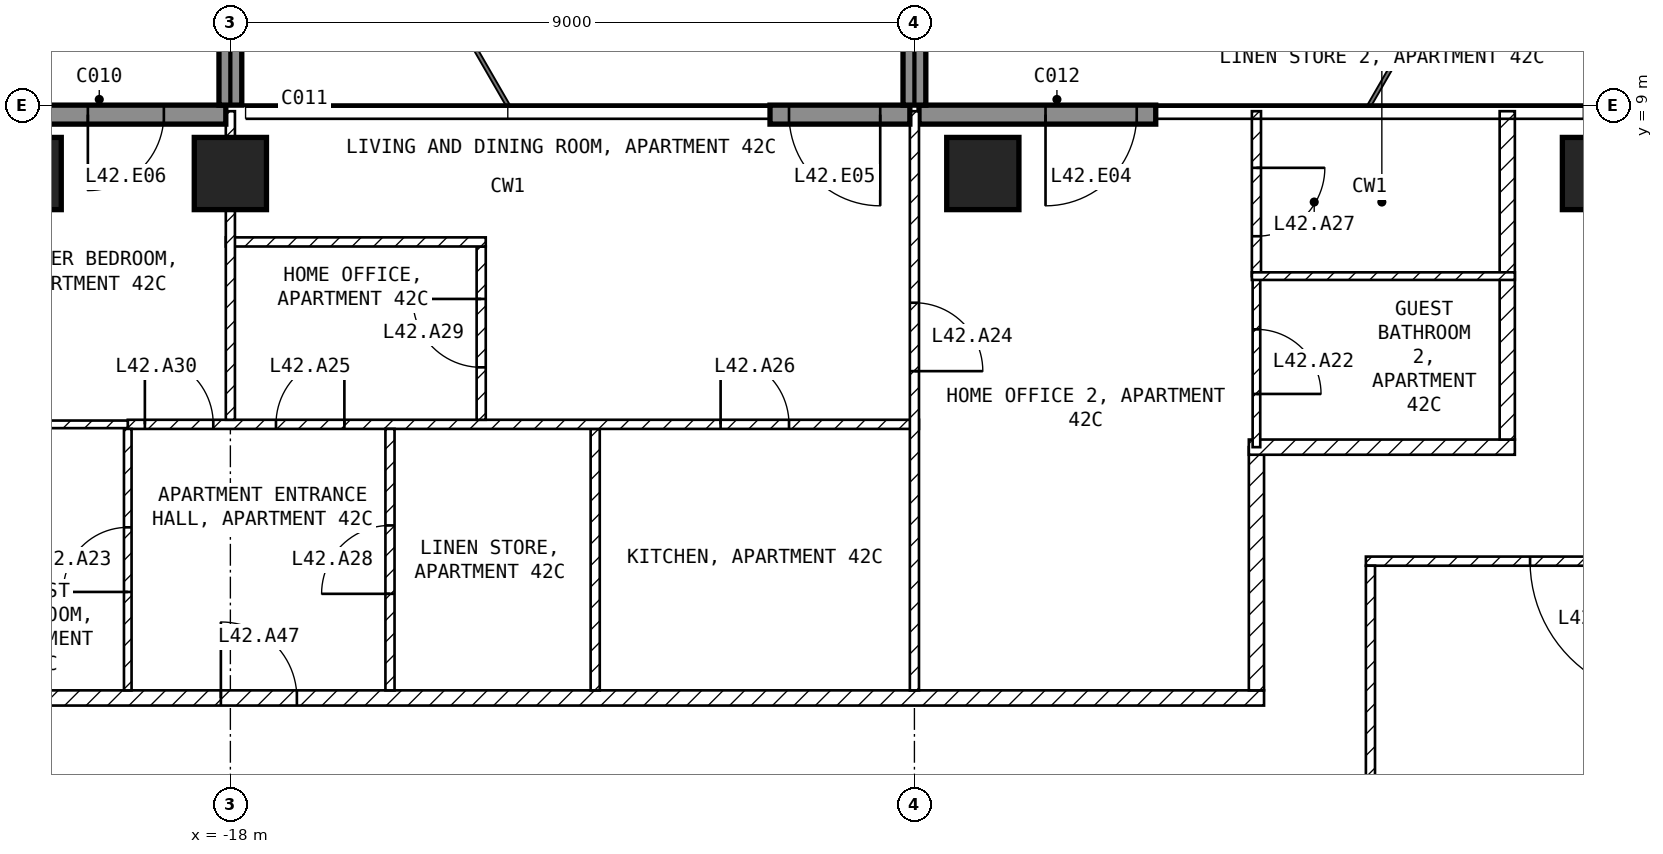
"""IFC4 building model, lengths in metres.
Left out: names, types, materials, properties, quantities, classifications, styles, units other than length and angle.
Written with IfcOpenShell. Run it as: python <this file> out.ifc"""

import sys

from ifc_helpers import new_model, si_unit, direction, frame, frame_2d, origin, origin_2d, place, context, subcontext, project, spatial, rectangle, extrude, element, fill, save


model = new_model("IFC4")
c1 = context("Model", 3, precision=1e-05, world=origin(), true_north=direction((0.0, 1.0)))
c2 = subcontext(c1, "Body", "Model", "MODEL_VIEW")
j1 = project(units=[si_unit("LENGTHUNIT", "METRE"), si_unit("PLANEANGLEUNIT", "RADIAN")], contexts=[c1])
p1 = place(None, origin())
s1 = spatial("IfcSite", under=j1, at=p1, CompositionType="ELEMENT")
p2 = place(p1, origin())
s2 = spatial("IfcBuilding", under=s1, at=p2, CompositionType="ELEMENT")
p3 = place(p2, frame((0.0, 0.0, 173.6)))
s3 = spatial("IfcBuildingStorey", under=s2, at=p3, CompositionType="ELEMENT", Elevation=173.6)
for number, where, z_axis, x_axis in (
    (1, (-20.7, 8.1, -0.25), (0.0, 0.0, 1.0), (1.0, 0.0, 0.0)),
    (2, (-18.0, 8.1, -0.25), (0.0, 0.0, 1.0), (1.0, 0.0, 0.0)),
    (3, (-8.1, 8.1, -0.25), (0.0, 0.0, 1.0), (1.0, 0.0, 0.0)),
    (4, (0.0, 8.1, -0.25), (0.0, 0.0, 1.0), (1.0, 0.0, 0.0)),
):
    element("IfcColumn", number, at=place(p3, frame(where, z_axis=z_axis, x_axis=x_axis)), inside=s3, PredefinedType="COLUMN", context=c2, shape_type="SweptSolid", body=[
        extrude(rectangle(XDim=0.95, YDim=0.95, at=origin_2d()), origin(), (0.0, 0.0, 1.0), 3.5),
    ])
p4 = place(p3, frame((-5.825, 8.875, 0.0), z_axis=(0.0, 0.0, 1.0), x_axis=(-1.0, 0.0, 0.0)))
e5 = element("IfcWall", 5, at=p4, inside=s3, PredefinedType="SOLIDWALL", context=c2, shape_type="SweptSolid", body=[
    extrude(rectangle(XDim=3.115, YDim=0.25, at=frame_2d((1.558, 0.0))), origin(), (0.0, 0.0, 1.0), 3.25),
])
p5 = place(p4, frame((0.25, 0.0, 0.0)))
e6 = element("IfcOpeningElement", 6, at=p5, cuts=e5, PredefinedType="OPENING", context=c2, shape_type="SweptSolid", body=[
    extrude(rectangle(XDim=1.2, YDim=2.4, at=frame_2d((0.6, 1.2))), frame((0.0, 0.135, 0.0), z_axis=(0.0, -1.0, 0.0), x_axis=(1.0, 0.0, 0.0)), (0.0, 0.0, 1.0), 0.27),
])
p6 = place(p3, frame((-9.06, 8.875, 0.0), z_axis=(0.0, 0.0, 1.0), x_axis=(-1.0, 0.0, 0.0)))
e7 = element("IfcWall", 7, at=p6, inside=s3, PredefinedType="SOLIDWALL", context=c2, shape_type="SweptSolid", body=[
    extrude(rectangle(XDim=1.84, YDim=0.25, at=frame_2d((0.92, 0.0))), origin(), (0.0, 0.0, 1.0), 3.25),
])
p7 = place(p6, frame((0.39, 0.0, 0.0)))
e8 = element("IfcOpeningElement", 8, at=p7, cuts=e7, PredefinedType="OPENING", context=c2, shape_type="SweptSolid", body=[
    extrude(rectangle(XDim=1.2, YDim=2.4, at=frame_2d((0.6, 1.2))), frame((0.0, 0.135, 0.0), z_axis=(0.0, -1.0, 0.0), x_axis=(1.0, 0.0, 0.0)), (0.0, 0.0, 1.0), 0.27),
])
p8 = place(p3, frame((-18.06, 8.875, 0.0), z_axis=(0.0, 0.0, 1.0), x_axis=(-1.0, 0.0, 0.0)))
e9 = element("IfcWall", 9, at=p8, inside=s3, PredefinedType="SOLIDWALL", context=c2, shape_type="SweptSolid", body=[
    extrude(rectangle(XDim=3.115, YDim=0.25, at=frame_2d((1.558, 0.0))), origin(), (0.0, 0.0, 1.0), 3.25),
])
p9 = place(p8, frame((0.815, 0.0, 0.0)))
e10 = element("IfcOpeningElement", 10, at=p9, cuts=e9, PredefinedType="OPENING", context=c2, shape_type="SweptSolid", body=[
    extrude(rectangle(XDim=1.0, YDim=2.4, at=frame_2d((0.5, 1.2))), frame((0.0, 0.135, 0.0), z_axis=(0.0, -1.0, 0.0), x_axis=(1.0, 0.0, 0.0)), (0.0, 0.0, 1.0), 0.27),
])
for number, where, z_axis, x_axis in (
    (11, (-18.0, 9.0, 0.0), (0.0, 0.0, 1.0), (0.0, 1.0, 0.0)),
    (12, (-9.0, 9.0, 0.0), (0.0, 0.0, 1.0), (0.0, 1.0, 0.0)),
):
    element("IfcWall", number, at=place(p3, frame(where, z_axis=z_axis, x_axis=x_axis)), inside=s3, PredefinedType="SOLIDWALL", context=c2, shape_type="SweptSolid", body=[
        extrude(rectangle(XDim=2.7, YDim=0.3, at=frame_2d((1.35, 0.0))), origin(), (0.0, 0.0, 1.0), 3.25),
    ])
p10 = place(p3, frame((3.06, 3.0, 0.0), z_axis=(0.0, 0.0, 1.0), x_axis=(-1.0, 0.0, 0.0)))
e13 = element("IfcWall", 13, at=p10, inside=s3, PredefinedType="PARTITIONING", context=c2, shape_type="SweptSolid", body=[
    extrude(rectangle(XDim=6.12, YDim=0.12, at=frame_2d((3.06, 0.0))), origin(), (0.0, 0.0, 1.0), 3.25),
])
p11 = place(p10, frame((2.16, 0.0, 0.0)))
e14 = element("IfcOpeningElement", 14, at=p11, cuts=e13, PredefinedType="OPENING", context=c2, shape_type="SweptSolid", body=[
    extrude(rectangle(XDim=1.8, YDim=2.1, at=frame_2d((0.9, 1.05))), frame((0.0, 0.07, 0.0), z_axis=(0.0, -1.0, 0.0), x_axis=(1.0, 0.0, 0.0)), (0.0, 0.0, 1.0), 0.14),
])
p12 = place(p3, frame((-3.0, 2.94, 0.0), z_axis=(0.0, 0.0, 1.0), x_axis=(0.0, -1.0, 0.0)))
e15 = element("IfcWall", 15, at=p12, inside=s3, PredefinedType="PARTITIONING", context=c2, shape_type="SweptSolid", body=[
    extrude(rectangle(XDim=5.88, YDim=0.12, at=frame_2d((2.94, 0.0))), origin(), (0.0, 0.0, 1.0), 3.25),
])
p13 = place(p3, frame((-21.6, 1.2, 0.0), z_axis=(0.0, 0.0, 1.0), x_axis=(1.0, 0.0, 0.0)))
e16 = element("IfcWall", 16, at=p13, inside=s3, PredefinedType="PARTITIONING", context=c2, shape_type="SweptSolid", body=[
    extrude(rectangle(XDim=17.2, YDim=0.2, at=frame_2d((8.6, 0.0))), origin(), (0.0, 0.0, 1.0), 3.25),
])
p14 = place(p13, frame((3.475, 0.0, 0.0)))
e17 = element("IfcOpeningElement", 17, at=p14, cuts=e16, PredefinedType="OPENING", context=c2, shape_type="SweptSolid", body=[
    extrude(rectangle(XDim=1.0, YDim=2.1, at=frame_2d((0.5, 1.05))), frame((0.0, 0.11, 0.0), z_axis=(0.0, -1.0, 0.0), x_axis=(1.0, 0.0, 0.0)), (0.0, 0.0, 1.0), 0.22),
])
p15 = place(p3, frame((-4.5, 1.3, 0.0), z_axis=(0.0, 0.0, 1.0), x_axis=(0.0, 1.0, 0.0)))
e18 = element("IfcWall", 18, at=p15, inside=s3, PredefinedType="PARTITIONING", context=c2, shape_type="SweptSolid", body=[
    extrude(rectangle(XDim=3.2, YDim=0.2, at=frame_2d((1.6, 0.0))), origin(), (0.0, 0.0, 1.0), 3.25),
])
p16 = place(p3, frame((-4.6, 4.5, 0.0), z_axis=(0.0, 0.0, 1.0), x_axis=(1.0, 0.0, 0.0)))
e19 = element("IfcWall", 19, at=p16, inside=s3, PredefinedType="PARTITIONING", context=c2, shape_type="SweptSolid", body=[
    extrude(rectangle(XDim=3.5, YDim=0.2, at=frame_2d((1.75, 0.0))), origin(), (0.0, 0.0, 1.0), 3.25),
])
p17 = place(p3, frame((-1.2, 4.6, 0.0), z_axis=(0.0, 0.0, 1.0), x_axis=(0.0, 1.0, 0.0)))
e20 = element("IfcWall", 20, at=p17, inside=s3, PredefinedType="PARTITIONING", context=c2, shape_type="SweptSolid", body=[
    extrude(rectangle(XDim=4.32, YDim=0.2, at=frame_2d((2.16, 0.0))), origin(), (0.0, 0.0, 1.0), 3.25),
])
p18 = place(p3, frame((-13.2, 1.3, 0.0), z_axis=(0.0, 0.0, 1.0), x_axis=(0.0, 1.0, 0.0)))
e21 = element("IfcWall", 21, at=p18, inside=s3, PredefinedType="PARTITIONING", context=c2, shape_type="SweptSolid", body=[
    extrude(rectangle(XDim=3.44, YDim=0.12, at=frame_2d((1.72, 0.0))), origin(), (0.0, 0.0, 1.0), 3.25),
])
p19 = place(p3, frame((-19.35, 4.8, 0.0), z_axis=(0.0, 0.0, 1.0), x_axis=(1.0, 0.0, 0.0)))
e22 = element("IfcWall", 22, at=p19, inside=s3, PredefinedType="PARTITIONING", context=c2, shape_type="SweptSolid", body=[
    extrude(rectangle(XDim=10.41, YDim=0.12, at=frame_2d((5.205, 0.0))), origin(), (0.0, 0.0, 1.0), 3.25),
])
p20 = place(p19, frame((1.95, 0.0, 0.0)))
e23 = element("IfcOpeningElement", 23, at=p20, cuts=e22, PredefinedType="OPENING", context=c2, shape_type="SweptSolid", body=[
    extrude(rectangle(XDim=0.9, YDim=2.1, at=frame_2d((0.45, 1.05))), frame((0.0, 0.07, 0.0), z_axis=(0.0, -1.0, 0.0), x_axis=(1.0, 0.0, 0.0)), (0.0, 0.0, 1.0), 0.14),
])
p21 = place(p19, frame((7.8, 0.0, 0.0)))
e24 = element("IfcOpeningElement", 24, at=p21, cuts=e22, PredefinedType="OPENING", context=c2, shape_type="SweptSolid", body=[
    extrude(rectangle(XDim=0.9, YDim=2.1, at=frame_2d((0.45, 1.05))), frame((0.0, 0.07, 0.0), z_axis=(0.0, -1.0, 0.0), x_axis=(1.0, 0.0, 0.0)), (0.0, 0.0, 1.0), 0.14),
])
p22 = place(p19, frame((0.225, 0.0, 0.0)))
e25 = element("IfcOpeningElement", 25, at=p22, cuts=e22, PredefinedType="OPENING", context=c2, shape_type="SweptSolid", body=[
    extrude(rectangle(XDim=0.9, YDim=2.1, at=frame_2d((0.45, 1.05))), frame((0.0, 0.07, 0.0), z_axis=(0.0, -1.0, 0.0), x_axis=(1.0, 0.0, 0.0)), (0.0, 0.0, 1.0), 0.14),
])
p23 = place(p3, frame((-9.0, 8.92, 0.0), z_axis=(0.0, 0.0, 1.0), x_axis=(0.0, -1.0, 0.0)))
e26 = element("IfcWall", 26, at=p23, inside=s3, PredefinedType="PARTITIONING", context=c2, shape_type="SweptSolid", body=[
    extrude(rectangle(XDim=7.62, YDim=0.12, at=frame_2d((3.81, 0.0))), origin(), (0.0, 0.0, 1.0), 3.25),
])
p24 = place(p23, frame((2.52, 0.0, 0.0)))
e27 = element("IfcOpeningElement", 27, at=p24, cuts=e26, PredefinedType="OPENING", context=c2, shape_type="SweptSolid", body=[
    extrude(rectangle(XDim=0.9, YDim=2.1, at=frame_2d((0.45, 1.05))), frame((0.0, 0.07, 0.0), z_axis=(0.0, -1.0, 0.0), x_axis=(1.0, 0.0, 0.0)), (0.0, 0.0, 1.0), 0.14),
])
p25 = place(p3, frame((-15.9, 1.3, 0.0), z_axis=(0.0, 0.0, 1.0), x_axis=(0.0, 1.0, 0.0)))
e28 = element("IfcWall", 28, at=p25, inside=s3, PredefinedType="PARTITIONING", context=c2, shape_type="SweptSolid", body=[
    extrude(rectangle(XDim=3.44, YDim=0.12, at=frame_2d((1.72, 0.0))), origin(), (0.0, 0.0, 1.0), 3.25),
])
p26 = place(p25, frame((1.27, 0.0, 0.0)))
e29 = element("IfcOpeningElement", 29, at=p26, cuts=e28, PredefinedType="OPENING", context=c2, shape_type="SweptSolid", body=[
    extrude(rectangle(XDim=0.9, YDim=2.1, at=frame_2d((0.45, 1.05))), frame((0.0, 0.07, 0.0), z_axis=(0.0, -1.0, 0.0), x_axis=(1.0, 0.0, 0.0)), (0.0, 0.0, 1.0), 0.14),
])
p27 = place(p3, frame((-19.35, 1.3, 0.0), z_axis=(0.0, 0.0, 1.0), x_axis=(0.0, 1.0, 0.0)))
e30 = element("IfcWall", 30, at=p27, inside=s3, PredefinedType="PARTITIONING", context=c2, shape_type="SweptSolid", body=[
    extrude(rectangle(XDim=3.44, YDim=0.1, at=frame_2d((1.72, 0.0))), origin(), (0.0, 0.0, 1.0), 3.25),
])
p28 = place(p27, frame((1.295, 0.0, 0.0)))
e31 = element("IfcOpeningElement", 31, at=p28, cuts=e30, PredefinedType="OPENING", context=c2, shape_type="SweptSolid", body=[
    extrude(rectangle(XDim=0.85, YDim=2.1, at=frame_2d((0.425, 1.05))), frame((0.0, 0.06, 0.0), z_axis=(0.0, -1.0, 0.0), x_axis=(1.0, 0.0, 0.0)), (0.0, 0.0, 1.0), 0.12),
])
p29 = place(p3, frame((-21.6, 4.8, 0.0), z_axis=(0.0, 0.0, 1.0), x_axis=(1.0, 0.0, 0.0)))
e32 = element("IfcWall", 32, at=p29, inside=s3, PredefinedType="PARTITIONING", context=c2, shape_type="SweptSolid", body=[
    extrude(rectangle(XDim=2.25, YDim=0.1, at=frame_2d((1.125, 0.0))), origin(), (0.0, 0.0, 1.0), 3.25),
])
p30 = place(p3, frame((-14.7, 4.86, 0.0), z_axis=(0.0, 0.0, 1.0), x_axis=(0.0, 1.0, 0.0)))
e33 = element("IfcWall", 33, at=p30, inside=s3, PredefinedType="PARTITIONING", context=c2, shape_type="SweptSolid", body=[
    extrude(rectangle(XDim=2.28, YDim=0.12, at=frame_2d((1.14, 0.0))), origin(), (0.0, 0.0, 1.0), 3.25),
])
p31 = place(p30, frame((0.69, 0.0, 0.0)))
e34 = element("IfcOpeningElement", 34, at=p31, cuts=e33, PredefinedType="OPENING", context=c2, shape_type="SweptSolid", body=[
    extrude(rectangle(XDim=0.9, YDim=2.1, at=frame_2d((0.45, 1.05))), frame((0.0, 0.07, 0.0), z_axis=(0.0, -1.0, 0.0), x_axis=(1.0, 0.0, 0.0)), (0.0, 0.0, 1.0), 0.14),
])
p32 = place(p3, frame((-14.64, 7.2, 0.0), z_axis=(0.0, 0.0, 1.0), x_axis=(-1.0, 0.0, 0.0)))
e35 = element("IfcWall", 35, at=p32, inside=s3, PredefinedType="PARTITIONING", context=c2, shape_type="SweptSolid", body=[
    extrude(rectangle(XDim=3.42, YDim=0.12, at=frame_2d((1.71, 0.0))), origin(), (0.0, 0.0, 1.0), 3.25),
])
p33 = place(p3, frame((-18.0, 4.86, 0.0), z_axis=(0.0, 0.0, 1.0), x_axis=(0.0, 1.0, 0.0)))
e36 = element("IfcWall", 36, at=p33, inside=s3, PredefinedType="PARTITIONING", context=c2, shape_type="SweptSolid", body=[
    extrude(rectangle(XDim=4.06, YDim=0.12, at=frame_2d((2.03, 0.0))), origin(), (0.0, 0.0, 1.0), 2.48),
])
p34 = place(p3, frame((-4.5, 6.75, 0.0), z_axis=(0.0, 0.0, 1.0), x_axis=(0.0, -1.0, 0.0)))
e37 = element("IfcWall", 37, at=p34, inside=s3, PredefinedType="PARTITIONING", context=c2, shape_type="SweptSolid", body=[
    extrude(rectangle(XDim=2.25, YDim=0.1, at=frame_2d((1.125, 0.0))), origin(), (0.0, 0.0, 1.0), 3.25),
])
p35 = place(p34, frame((0.7, 0.0, 0.0)))
e38 = element("IfcOpeningElement", 38, at=p35, cuts=e37, PredefinedType="OPENING", context=c2, shape_type="SweptSolid", body=[
    extrude(rectangle(XDim=0.85, YDim=2.1, at=frame_2d((0.425, 1.05))), frame((0.0, 0.06, 0.0), z_axis=(0.0, -1.0, 0.0), x_axis=(1.0, 0.0, 0.0)), (0.0, 0.0, 1.0), 0.12),
])
p36 = place(p3, frame((-4.5, 8.92, 0.0), z_axis=(0.0, 0.0, 1.0), x_axis=(0.0, -1.0, 0.0)))
e39 = element("IfcWall", 39, at=p36, inside=s3, PredefinedType="PARTITIONING", context=c2, shape_type="SweptSolid", body=[
    extrude(rectangle(XDim=2.17, YDim=0.12, at=frame_2d((1.085, 0.0))), origin(), (0.0, 0.0, 1.0), 3.25),
])
p37 = place(p36, frame((0.745, 0.0, 0.0)))
e40 = element("IfcOpeningElement", 40, at=p37, cuts=e39, PredefinedType="OPENING", context=c2, shape_type="SweptSolid", body=[
    extrude(rectangle(XDim=0.9, YDim=2.1, at=frame_2d((0.45, 1.05))), frame((0.0, 0.07, 0.0), z_axis=(0.0, -1.0, 0.0), x_axis=(1.0, 0.0, 0.0)), (0.0, 0.0, 1.0), 0.14),
])
p38 = place(p3, frame((-4.56, 6.75, 0.0), z_axis=(0.0, 0.0, 1.0), x_axis=(1.0, 0.0, 0.0)))
e41 = element("IfcWall", 41, at=p38, inside=s3, PredefinedType="PARTITIONING", context=c2, shape_type="SweptSolid", body=[
    extrude(rectangle(XDim=3.46, YDim=0.1, at=frame_2d((1.73, 0.0))), origin(), (0.0, 0.0, 1.0), 3.25),
])
p39 = place(p5, origin())
e42 = element("IfcDoor", 42, at=p39, inside=s3, OperationType="SINGLE_SWING_RIGHT", PredefinedType="DOOR", context=c2, shape_type="SweptSolid", body=[
    extrude(rectangle(XDim=1.2, YDim=2.4, at=frame_2d((0.6, 1.2))), frame((0.0, 0.025, 0.0), z_axis=(0.0, -1.0, 0.0), x_axis=(1.0, 0.0, 0.0)), (0.0, 0.0, 1.0), 0.05),
])
fill(e6, e42)
p40 = place(p7, origin())
e43 = element("IfcDoor", 43, at=p40, inside=s3, OperationType="SINGLE_SWING_LEFT", PredefinedType="DOOR", context=c2, shape_type="SweptSolid", body=[
    extrude(rectangle(XDim=1.2, YDim=2.4, at=frame_2d((0.6, 1.2))), frame((0.0, 0.025, 0.0), z_axis=(0.0, -1.0, 0.0), x_axis=(1.0, 0.0, 0.0)), (0.0, 0.0, 1.0), 0.05),
])
fill(e8, e43)
p41 = place(p9, origin())
e44 = element("IfcDoor", 44, at=p41, inside=s3, OperationType="SINGLE_SWING_RIGHT", PredefinedType="DOOR", context=c2, shape_type="SweptSolid", body=[
    extrude(rectangle(XDim=1.0, YDim=2.4, at=frame_2d((0.5, 1.2))), frame((0.0, 0.025, 0.0), z_axis=(0.0, -1.0, 0.0), x_axis=(1.0, 0.0, 0.0)), (0.0, 0.0, 1.0), 0.05),
])
fill(e10, e44)
p42 = place(p11, origin())
e45 = element("IfcDoor", 45, at=p42, inside=s3, OperationType="SINGLE_SWING_LEFT", PredefinedType="DOOR", context=c2, shape_type="SweptSolid", body=[
    extrude(rectangle(XDim=1.8, YDim=2.1, at=frame_2d((0.9, 1.05))), frame((0.0, 0.025, 0.0), z_axis=(0.0, -1.0, 0.0), x_axis=(1.0, 0.0, 0.0)), (0.0, 0.0, 1.0), 0.05),
])
fill(e14, e45)
p43 = place(p35, origin())
e46 = element("IfcDoor", 46, at=p43, inside=s3, OperationType="SINGLE_SWING_RIGHT", PredefinedType="DOOR", context=c2, shape_type="SweptSolid", body=[
    extrude(rectangle(XDim=0.85, YDim=2.1, at=frame_2d((0.425, 1.05))), frame((0.0, 0.025, 0.0), z_axis=(0.0, -1.0, 0.0), x_axis=(1.0, 0.0, 0.0)), (0.0, 0.0, 1.0), 0.05),
])
fill(e38, e46)
p44 = place(p28, origin())
e47 = element("IfcDoor", 47, at=p44, inside=s3, OperationType="SINGLE_SWING_LEFT", PredefinedType="DOOR", context=c2, shape_type="SweptSolid", body=[
    extrude(rectangle(XDim=0.85, YDim=2.1, at=frame_2d((0.425, 1.05))), frame((0.0, 0.025, 0.0), z_axis=(0.0, -1.0, 0.0), x_axis=(1.0, 0.0, 0.0)), (0.0, 0.0, 1.0), 0.05),
])
fill(e31, e47)
p45 = place(p24, origin())
e48 = element("IfcDoor", 48, at=p45, inside=s3, OperationType="SINGLE_SWING_RIGHT", PredefinedType="DOOR", context=c2, shape_type="SweptSolid", body=[
    extrude(rectangle(XDim=0.9, YDim=2.1, at=frame_2d((0.45, 1.05))), frame((0.0, 0.025, 0.0), z_axis=(0.0, -1.0, 0.0), x_axis=(1.0, 0.0, 0.0)), (0.0, 0.0, 1.0), 0.05),
])
fill(e27, e48)
p46 = place(p20, origin())
e49 = element("IfcDoor", 49, at=p46, inside=s3, OperationType="SINGLE_SWING_RIGHT", PredefinedType="DOOR", context=c2, shape_type="SweptSolid", body=[
    extrude(rectangle(XDim=0.9, YDim=2.1, at=frame_2d((0.45, 1.05))), frame((0.0, 0.025, 0.0), z_axis=(0.0, -1.0, 0.0), x_axis=(1.0, 0.0, 0.0)), (0.0, 0.0, 1.0), 0.05),
])
fill(e23, e49)
p47 = place(p21, origin())
e50 = element("IfcDoor", 50, at=p47, inside=s3, OperationType="SINGLE_SWING_LEFT", PredefinedType="DOOR", context=c2, shape_type="SweptSolid", body=[
    extrude(rectangle(XDim=0.9, YDim=2.1, at=frame_2d((0.45, 1.05))), frame((0.0, 0.025, 0.0), z_axis=(0.0, -1.0, 0.0), x_axis=(1.0, 0.0, 0.0)), (0.0, 0.0, 1.0), 0.05),
])
fill(e24, e50)
p48 = place(p37, origin())
e51 = element("IfcDoor", 51, at=p48, inside=s3, OperationType="SINGLE_SWING_LEFT", PredefinedType="DOOR", context=c2, shape_type="SweptSolid", body=[
    extrude(rectangle(XDim=0.9, YDim=2.1, at=frame_2d((0.45, 1.05))), frame((0.0, 0.025, 0.0), z_axis=(0.0, -1.0, 0.0), x_axis=(1.0, 0.0, 0.0)), (0.0, 0.0, 1.0), 0.05),
])
fill(e40, e51)
p49 = place(p26, origin())
e52 = element("IfcDoor", 52, at=p49, inside=s3, OperationType="SINGLE_SWING_LEFT", PredefinedType="DOOR", context=c2, shape_type="SweptSolid", body=[
    extrude(rectangle(XDim=0.9, YDim=2.1, at=frame_2d((0.45, 1.05))), frame((0.0, 0.025, 0.0), z_axis=(0.0, -1.0, 0.0), x_axis=(1.0, 0.0, 0.0)), (0.0, 0.0, 1.0), 0.05),
])
fill(e29, e52)
p50 = place(p31, origin())
e53 = element("IfcDoor", 53, at=p50, inside=s3, OperationType="SINGLE_SWING_RIGHT", PredefinedType="DOOR", context=c2, shape_type="SweptSolid", body=[
    extrude(rectangle(XDim=0.9, YDim=2.1, at=frame_2d((0.45, 1.05))), frame((0.0, 0.025, 0.0), z_axis=(0.0, -1.0, 0.0), x_axis=(1.0, 0.0, 0.0)), (0.0, 0.0, 1.0), 0.05),
])
fill(e34, e53)
p51 = place(p22, origin())
e54 = element("IfcDoor", 54, at=p51, inside=s3, OperationType="SINGLE_SWING_LEFT", PredefinedType="DOOR", context=c2, shape_type="SweptSolid", body=[
    extrude(rectangle(XDim=0.9, YDim=2.1, at=frame_2d((0.45, 1.05))), frame((0.0, 0.025, 0.0), z_axis=(0.0, -1.0, 0.0), x_axis=(1.0, 0.0, 0.0)), (0.0, 0.0, 1.0), 0.05),
])
fill(e25, e54)
p52 = place(p14, origin())
e55 = element("IfcDoor", 55, at=p52, inside=s3, OperationType="SINGLE_SWING_LEFT", PredefinedType="DOOR", context=c2, shape_type="SweptSolid", body=[
    extrude(rectangle(XDim=1.0, YDim=2.1, at=frame_2d((0.5, 1.05))), frame((0.0, 0.025, 0.0), z_axis=(0.0, -1.0, 0.0), x_axis=(1.0, 0.0, 0.0)), (0.0, 0.0, 1.0), 0.05),
])
fill(e17, e55)
save(model, sys.argv[1])
